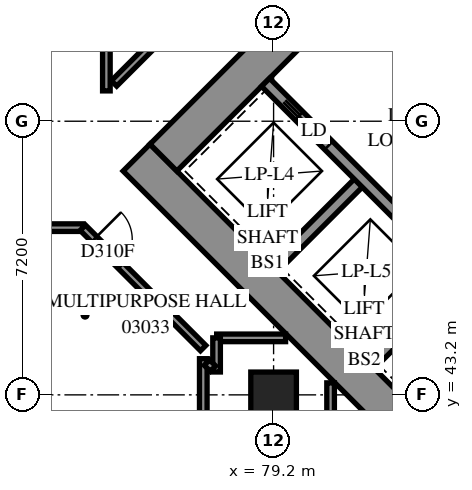
"""IFC4 building model, lengths in metres.
Left out: names, types, materials, properties, quantities, classifications, styles, units other than length and angle.
Written with IfcOpenShell. Run it as: python <this file> out.ifc"""

import sys

from ifc_helpers import new_model, si_unit, direction, frame, frame_2d, origin, origin_2d, place, context, subcontext, project, spatial, polyline, rectangle, outline, extrude, element, fill, save


model = new_model("IFC4")
c1 = context("Model", 3, precision=1e-05, world=origin(), true_north=direction((0.0, 1.0)))
c2 = subcontext(c1, "Body", "Model", "MODEL_VIEW")
j1 = project(units=[si_unit("LENGTHUNIT", "METRE"), si_unit("PLANEANGLEUNIT", "RADIAN")], contexts=[c1])
p1 = place(None, origin())
s1 = spatial("IfcSite", under=j1, at=p1, CompositionType="ELEMENT")
p2 = place(p1, origin())
s2 = spatial("IfcBuilding", under=s1, at=p2, CompositionType="ELEMENT")
p3 = place(p2, frame((0.0, 0.0, 14.4)))
s3 = spatial("IfcBuildingStorey", under=s2, at=p3, CompositionType="ELEMENT", Elevation=14.4)
p4 = place(p3, frame((79.2, 43.2, 0.0), z_axis=(0.0, 0.0, 1.0), x_axis=(1.0, 0.0, 0.0)))
e1 = element("IfcColumn", 1, at=p4, inside=s3, PredefinedType="COLUMN", context=c2, shape_type="SweptSolid", body=[
    extrude(rectangle(XDim=1.2, YDim=1.2, at=origin_2d()), origin(), (0.0, 0.0, 1.0), 3.8),
])
p5 = place(p3, frame((75.594, 49.443, -0.4), z_axis=(0.0, 0.0, 1.0), x_axis=(0.7071037324, -0.70710983, 0.0)))
e2 = element("IfcWall", 2, at=p5, inside=s3, PredefinedType="SHEAR", context=c2, shape_type="SweptSolid", body=[
    extrude(rectangle(XDim=16.4, YDim=1.0, at=frame_2d((8.2, 0.0))), origin(), (0.0, 0.0, 1.0), 3.5),
])
p6 = place(p3, frame((76.301, 49.443, -0.4), z_axis=(0.0, 0.0, 1.0), x_axis=(0.7071067812, 0.7071067812, 0.0)))
e3 = element("IfcWall", 3, at=p6, inside=s3, PredefinedType="SHEAR", context=c2, shape_type="SweptSolid", body=[
    extrude(rectangle(XDim=14.4, YDim=1.0, at=frame_2d((7.2, 0.0))), origin(), (0.0, 0.0, 1.0), 3.5),
])
p7 = place(p6, frame((4.55, 0.0, 0.4)))
e4 = element("IfcOpeningElement", 4, at=p7, cuts=e3, PredefinedType="OPENING", context=c2, shape_type="SweptSolid", body=[
    extrude(rectangle(XDim=1.1, YDim=2.1, at=frame_2d((0.55, 1.05))), frame((0.0, 0.51, 0.0), z_axis=(0.0, -1.0, 0.0), x_axis=(1.0, 0.0, 0.0)), (0.0, 0.0, 1.0), 1.02),
])
p8 = place(p6, frame((11.35, 0.0, 0.4)))
e5 = element("IfcOpeningElement", 5, at=p8, cuts=e3, PredefinedType="OPENING", context=c2, shape_type="SweptSolid", body=[
    extrude(rectangle(XDim=1.1, YDim=2.1, at=frame_2d((0.55, 1.05))), frame((0.0, 0.51, 0.0), z_axis=(0.0, -1.0, 0.0), x_axis=(1.0, 0.0, 0.0)), (0.0, 0.0, 1.0), 1.02),
])
p9 = place(p3, frame((79.2, 46.544, 0.0), z_axis=(0.0, 0.0, 1.0), x_axis=(0.7071219326, 0.7070916295, 0.0)))
e6 = element("IfcWall", 6, at=p9, inside=s3, PredefinedType="SOLIDWALL", context=c2, shape_type="SweptSolid", body=[
    extrude(rectangle(XDim=3.3, YDim=0.3, at=frame_2d((1.65, 0.0))), origin(), (0.0, 0.0, 1.0), 3.8),
])
p10 = place(p3, frame((81.746, 43.999, 0.0), z_axis=(0.0, 0.0, 1.0), x_axis=(0.7071067812, 0.7071067812, 0.0)))
e7 = element("IfcWall", 7, at=p10, inside=s3, PredefinedType="SOLIDWALL", context=c2, shape_type="SweptSolid", body=[
    extrude(rectangle(XDim=3.3, YDim=0.3, at=frame_2d((1.65, 0.0))), origin(), (0.0, 0.0, 1.0), 3.8),
])
p11 = place(p3, frame((78.988, 51.423, 0.0), z_axis=(0.0, 0.0, 1.0), x_axis=(0.7071067812, -0.7071067812, 0.0)))
e8 = element("IfcWall", 8, at=p11, inside=s3, PredefinedType="SOLIDWALL", context=c2, shape_type="SweptSolid", body=[
    extrude(rectangle(XDim=14.4, YDim=0.3, at=frame_2d((7.2, 0.0))), origin(), (0.0, 0.0, 1.0), 3.8),
])
p12 = place(p11, frame((1.25, 0.0, 0.0)))
e9 = element("IfcOpeningElement", 9, at=p12, cuts=e8, PredefinedType="OPENING", context=c2, shape_type="SweptSolid", body=[
    extrude(rectangle(XDim=1.1, YDim=2.1, at=frame_2d((0.55, 1.05))), frame((0.0, 0.16, 0.0), z_axis=(0.0, -1.0, 0.0), x_axis=(1.0, 0.0, 0.0)), (0.0, 0.0, 1.0), 0.32),
])
p13 = place(p11, frame((4.85, 0.0, 0.0)))
e10 = element("IfcOpeningElement", 10, at=p13, cuts=e8, PredefinedType="OPENING", context=c2, shape_type="SweptSolid", body=[
    extrude(rectangle(XDim=1.1, YDim=2.1, at=frame_2d((0.55, 1.05))), frame((0.0, 0.16, 0.0), z_axis=(0.0, -1.0, 0.0), x_axis=(1.0, 0.0, 0.0)), (0.0, 0.0, 1.0), 0.32),
])
p14 = place(p11, frame((8.45, 0.0, 0.0)))
e11 = element("IfcOpeningElement", 11, at=p14, cuts=e8, PredefinedType="OPENING", context=c2, shape_type="SweptSolid", body=[
    extrude(rectangle(XDim=1.1, YDim=2.1, at=frame_2d((0.55, 1.05))), frame((0.0, 0.16, 0.0), z_axis=(0.0, -1.0, 0.0), x_axis=(1.0, 0.0, 0.0)), (0.0, 0.0, 1.0), 0.32),
])
p15 = place(p11, frame((12.05, 0.0, 0.0)))
e12 = element("IfcOpeningElement", 12, at=p15, cuts=e8, PredefinedType="OPENING", context=c2, shape_type="SweptSolid", body=[
    extrude(rectangle(XDim=1.1, YDim=2.1, at=frame_2d((0.55, 1.05))), frame((0.0, 0.16, 0.0), z_axis=(0.0, -1.0, 0.0), x_axis=(1.0, 0.0, 0.0)), (0.0, 0.0, 1.0), 0.32),
])
p16 = place(p3, frame((81.534, 53.969, 0.0), z_axis=(0.0, 0.0, 1.0), x_axis=(0.707103309, -0.7071102534, 0.0)))
e13 = element("IfcWall", 13, at=p16, inside=s3, PredefinedType="SOLIDWALL", context=c2, shape_type="SweptSolid", body=[
    extrude(rectangle(XDim=14.4, YDim=0.3, at=frame_2d((7.2, 0.0))), origin(), (0.0, 0.0, 1.0), 3.8),
])
p17 = place(p16, frame((12.05, 0.0, 0.0)))
e14 = element("IfcOpeningElement", 14, at=p17, cuts=e13, PredefinedType="OPENING", context=c2, shape_type="SweptSolid", body=[
    extrude(rectangle(XDim=1.1, YDim=2.1, at=frame_2d((0.55, 1.05))), frame((0.0, 0.16, 0.0), z_axis=(0.0, -1.0, 0.0), x_axis=(1.0, 0.0, 0.0)), (0.0, 0.0, 1.0), 0.32),
])
p18 = place(p3, frame((117.843, 34.665, 0.0), z_axis=(0.0, 0.0, 1.0), x_axis=(-0.7071067812, 0.7071067812, 0.0)))
e15 = element("IfcWall", 15, at=p18, inside=s3, PredefinedType="SOLIDWALL", context=c2, shape_type="SweptSolid", body=[
    extrude(outline(polyline([(-0.275, -0.275), (54.222, -0.275), (53.994, 0.275), (0.275, 0.275), (-0.275, -0.275)])), origin(), (0.0, 0.0, 1.0), 3.8),
])
p19 = place(p18, frame((0.8, 0.0, 0.7)))
e16 = element("IfcOpeningElement", 16, at=p19, cuts=e15, PredefinedType="OPENING", context=c2, shape_type="SweptSolid", body=[
    extrude(rectangle(XDim=1.8, YDim=2.6, at=frame_2d((0.9, 1.3))), frame((0.0, 0.285, 0.0), z_axis=(0.0, -1.0, 0.0), x_axis=(1.0, 0.0, 0.0)), (0.0, 0.0, 1.0), 0.57),
])
p20 = place(p18, frame((4.225, 0.0, 0.7)))
e17 = element("IfcOpeningElement", 17, at=p20, cuts=e15, PredefinedType="OPENING", context=c2, shape_type="SweptSolid", body=[
    extrude(rectangle(XDim=1.8, YDim=2.6, at=frame_2d((0.9, 1.3))), frame((0.0, 0.285, 0.0), z_axis=(0.0, -1.0, 0.0), x_axis=(1.0, 0.0, 0.0)), (0.0, 0.0, 1.0), 0.57),
])
p21 = place(p18, frame((7.825, 0.0, 0.7)))
e18 = element("IfcOpeningElement", 18, at=p21, cuts=e15, PredefinedType="OPENING", context=c2, shape_type="SweptSolid", body=[
    extrude(rectangle(XDim=1.8, YDim=2.6, at=frame_2d((0.9, 1.3))), frame((0.0, 0.285, 0.0), z_axis=(0.0, -1.0, 0.0), x_axis=(1.0, 0.0, 0.0)), (0.0, 0.0, 1.0), 0.57),
])
p22 = place(p18, frame((11.425, 0.0, 0.7)))
e19 = element("IfcOpeningElement", 19, at=p22, cuts=e15, PredefinedType="OPENING", context=c2, shape_type="SweptSolid", body=[
    extrude(rectangle(XDim=1.8, YDim=2.6, at=frame_2d((0.9, 1.3))), frame((0.0, 0.285, 0.0), z_axis=(0.0, -1.0, 0.0), x_axis=(1.0, 0.0, 0.0)), (0.0, 0.0, 1.0), 0.57),
])
p23 = place(p18, frame((15.025, 0.0, 0.7)))
e20 = element("IfcOpeningElement", 20, at=p23, cuts=e15, PredefinedType="OPENING", context=c2, shape_type="SweptSolid", body=[
    extrude(rectangle(XDim=1.8, YDim=2.6, at=frame_2d((0.9, 1.3))), frame((0.0, 0.285, 0.0), z_axis=(0.0, -1.0, 0.0), x_axis=(1.0, 0.0, 0.0)), (0.0, 0.0, 1.0), 0.57),
])
p24 = place(p18, frame((18.625, 0.0, 0.7)))
e21 = element("IfcOpeningElement", 21, at=p24, cuts=e15, PredefinedType="OPENING", context=c2, shape_type="SweptSolid", body=[
    extrude(rectangle(XDim=1.8, YDim=2.6, at=frame_2d((0.9, 1.3))), frame((0.0, 0.285, 0.0), z_axis=(0.0, -1.0, 0.0), x_axis=(1.0, 0.0, 0.0)), (0.0, 0.0, 1.0), 0.57),
])
p25 = place(p18, frame((22.225, 0.0, 0.7)))
e22 = element("IfcOpeningElement", 22, at=p25, cuts=e15, PredefinedType="OPENING", context=c2, shape_type="SweptSolid", body=[
    extrude(rectangle(XDim=1.8, YDim=2.6, at=frame_2d((0.9, 1.3))), frame((0.0, 0.285, 0.0), z_axis=(0.0, -1.0, 0.0), x_axis=(1.0, 0.0, 0.0)), (0.0, 0.0, 1.0), 0.57),
])
p26 = place(p18, frame((25.825, 0.0, 0.7)))
e23 = element("IfcOpeningElement", 23, at=p26, cuts=e15, PredefinedType="OPENING", context=c2, shape_type="SweptSolid", body=[
    extrude(rectangle(XDim=1.8, YDim=2.6, at=frame_2d((0.9, 1.3))), frame((0.0, 0.285, 0.0), z_axis=(0.0, -1.0, 0.0), x_axis=(1.0, 0.0, 0.0)), (0.0, 0.0, 1.0), 0.57),
])
p27 = place(p18, frame((29.425, 0.0, 0.7)))
e24 = element("IfcOpeningElement", 24, at=p27, cuts=e15, PredefinedType="OPENING", context=c2, shape_type="SweptSolid", body=[
    extrude(rectangle(XDim=1.8, YDim=2.6, at=frame_2d((0.9, 1.3))), frame((0.0, 0.285, 0.0), z_axis=(0.0, -1.0, 0.0), x_axis=(1.0, 0.0, 0.0)), (0.0, 0.0, 1.0), 0.57),
])
p28 = place(p18, frame((33.025, 0.0, 0.7)))
e25 = element("IfcOpeningElement", 25, at=p28, cuts=e15, PredefinedType="OPENING", context=c2, shape_type="SweptSolid", body=[
    extrude(rectangle(XDim=1.8, YDim=2.6, at=frame_2d((0.9, 1.3))), frame((0.0, 0.285, 0.0), z_axis=(0.0, -1.0, 0.0), x_axis=(1.0, 0.0, 0.0)), (0.0, 0.0, 1.0), 0.57),
])
p29 = place(p18, frame((36.625, 0.0, 0.7)))
e26 = element("IfcOpeningElement", 26, at=p29, cuts=e15, PredefinedType="OPENING", context=c2, shape_type="SweptSolid", body=[
    extrude(rectangle(XDim=1.8, YDim=2.6, at=frame_2d((0.9, 1.3))), frame((0.0, 0.285, 0.0), z_axis=(0.0, -1.0, 0.0), x_axis=(1.0, 0.0, 0.0)), (0.0, 0.0, 1.0), 0.57),
])
p30 = place(p18, frame((40.225, 0.0, 0.7)))
e27 = element("IfcOpeningElement", 27, at=p30, cuts=e15, PredefinedType="OPENING", context=c2, shape_type="SweptSolid", body=[
    extrude(rectangle(XDim=1.8, YDim=2.6, at=frame_2d((0.9, 1.3))), frame((0.0, 0.285, 0.0), z_axis=(0.0, -1.0, 0.0), x_axis=(1.0, 0.0, 0.0)), (0.0, 0.0, 1.0), 0.57),
])
p31 = place(p18, frame((43.825, 0.0, 0.7)))
e28 = element("IfcOpeningElement", 28, at=p31, cuts=e15, PredefinedType="OPENING", context=c2, shape_type="SweptSolid", body=[
    extrude(rectangle(XDim=1.8, YDim=2.6, at=frame_2d((0.9, 1.3))), frame((0.0, 0.285, 0.0), z_axis=(0.0, -1.0, 0.0), x_axis=(1.0, 0.0, 0.0)), (0.0, 0.0, 1.0), 0.57),
])
p32 = place(p18, frame((47.425, 0.0, 0.7)))
e29 = element("IfcOpeningElement", 29, at=p32, cuts=e15, PredefinedType="OPENING", context=c2, shape_type="SweptSolid", body=[
    extrude(rectangle(XDim=1.8, YDim=2.6, at=frame_2d((0.9, 1.3))), frame((0.0, 0.285, 0.0), z_axis=(0.0, -1.0, 0.0), x_axis=(1.0, 0.0, 0.0)), (0.0, 0.0, 1.0), 0.57),
])
p33 = place(p18, frame((51.06, 0.0, 0.7)))
e30 = element("IfcOpeningElement", 30, at=p33, cuts=e15, PredefinedType="OPENING", context=c2, shape_type="SweptSolid", body=[
    extrude(rectangle(XDim=1.8, YDim=2.6, at=frame_2d((0.9, 1.3))), frame((0.0, 0.285, 0.0), z_axis=(0.0, -1.0, 0.0), x_axis=(1.0, 0.0, 0.0)), (0.0, 0.0, 1.0), 0.57),
])
p34 = place(p3, frame((54.8, 47.6, 0.0), z_axis=(0.0, 0.0, 1.0), x_axis=(1.0, 0.0, 0.0)))
e31 = element("IfcWall", 31, at=p34, inside=s3, PredefinedType="PARTITIONING", context=c2, shape_type="SweptSolid", body=[
    extrude(rectangle(XDim=19.384, YDim=0.2, at=frame_2d((9.692, 0.0))), origin(), (0.0, 0.0, 1.0), 3.8),
])
p35 = place(p34, frame((8.458, 0.0, 0.0)))
e32 = element("IfcOpeningElement", 32, at=p35, cuts=e31, PredefinedType="OPENING", context=c2, shape_type="SweptSolid", body=[
    extrude(rectangle(XDim=1.0, YDim=2.1, at=frame_2d((0.5, 1.05))), frame((0.0, 0.11, 0.0), z_axis=(0.0, -1.0, 0.0), x_axis=(1.0, 0.0, 0.0)), (0.0, 0.0, 1.0), 0.22),
])
p36 = place(p34, frame((14.107, 0.0, 0.0)))
e33 = element("IfcOpeningElement", 33, at=p36, cuts=e31, PredefinedType="OPENING", context=c2, shape_type="SweptSolid", body=[
    extrude(rectangle(XDim=1.0, YDim=2.1, at=frame_2d((0.5, 1.05))), frame((0.0, 0.11, 0.0), z_axis=(0.0, -1.0, 0.0), x_axis=(1.0, 0.0, 0.0)), (0.0, 0.0, 1.0), 0.22),
])
p37 = place(p3, frame((74.181, 47.597, 0.0), z_axis=(0.0, 0.0, 1.0), x_axis=(0.7071067812, -0.7071067812, 0.0)))
e34 = element("IfcWall", 34, at=p37, inside=s3, PredefinedType="PARTITIONING", context=c2, shape_type="SweptSolid", body=[
    extrude(rectangle(XDim=4.477, YDim=0.2, at=frame_2d((2.239, 0.0))), origin(), (0.0, 0.0, 1.0), 3.8),
])
p38 = place(p37, frame((0.423, 0.0, 0.0)))
e35 = element("IfcOpeningElement", 35, at=p38, cuts=e34, PredefinedType="OPENING", context=c2, shape_type="SweptSolid", body=[
    extrude(rectangle(XDim=1.0, YDim=2.1, at=frame_2d((0.5, 1.05))), frame((0.0, 0.11, 0.0), z_axis=(0.0, -1.0, 0.0), x_axis=(1.0, 0.0, 0.0)), (0.0, 0.0, 1.0), 0.22),
])
p39 = place(p3, frame((75.001, 51.395, 0.0), z_axis=(0.0, 0.0, 1.0), x_axis=(0.7075218716, 0.7066914469, 0.0)))
e36 = element("IfcWall", 36, at=p39, inside=s3, PredefinedType="PARTITIONING", context=c2, shape_type="SweptSolid", body=[
    extrude(rectangle(XDim=2.408, YDim=0.2, at=frame_2d((1.204, 0.0))), origin(), (0.0, 0.0, 1.0), 3.8),
])
p40 = place(p3, frame((74.8, 51.198, 0.0), z_axis=(0.0, 0.0, 1.0), x_axis=(0.0, 1.0, 0.0)))
e37 = element("IfcWall", 37, at=p40, inside=s3, PredefinedType="PARTITIONING", context=c2, shape_type="SweptSolid", body=[
    extrude(rectangle(XDim=1.902, YDim=0.2, at=frame_2d((0.951, 0.0))), origin(), (0.0, 0.0, 1.0), 3.8),
])
for number, where, z_axis, x_axis in (
    (38, (77.702, 44.7, 0.0), (0.0, 0.0, 1.0), (1.0, 0.0, 0.0)),
    (39, (80.7, 41.702, 0.0), (0.0, 0.0, 1.0), (0.0, 1.0, 0.0)),
):
    element("IfcWall", number, at=place(p3, frame(where, z_axis=z_axis, x_axis=x_axis)), inside=s3, PredefinedType="PARTITIONING", context=c2, shape_type="SweptSolid", body=[
        extrude(rectangle(XDim=1.814, YDim=0.2, at=frame_2d((0.907, 0.0))), origin(), (0.0, 0.0, 1.0), 3.8),
    ])
p41 = place(p3, frame((77.35, 42.384, 0.0), z_axis=(0.0, 0.0, 1.0), x_axis=(0.0, 1.0, 0.0)))
e40 = element("IfcWall", 40, at=p41, inside=s3, PredefinedType="PARTITIONING", context=c2, shape_type="SweptSolid", body=[
    extrude(rectangle(XDim=1.768, YDim=0.2, at=frame_2d((0.884, 0.0))), origin(), (0.0, 0.0, 1.0), 3.8),
])
p42 = place(p3, frame((77.7, 43.802, 0.0), z_axis=(0.0, 0.0, 1.0), x_axis=(0.0, 1.0, 0.0)))
e41 = element("IfcWall", 41, at=p42, inside=s3, PredefinedType="PARTITIONING", context=c2, shape_type="SweptSolid", body=[
    extrude(rectangle(XDim=0.898, YDim=0.2, at=frame_2d((0.449, 0.0))), origin(), (0.0, 0.0, 1.0), 3.8),
])
p43 = place(p3, frame((77.445, 44.05, 0.0), z_axis=(0.0, 0.0, 1.0), x_axis=(0.707329037, -0.7068844555, 0.0)))
e42 = element("IfcWall", 42, at=p43, inside=s3, PredefinedType="PARTITIONING", context=c2, shape_type="SweptSolid", body=[
    extrude(rectangle(XDim=0.225, YDim=0.2, at=frame_2d((0.112, 0.0))), origin(), (0.0, 0.0, 1.0), 3.8),
])
p44 = place(p12, origin())
e43 = element("IfcDoor", 43, at=p44, inside=s3, OperationType="SLIDING_TO_LEFT", PredefinedType="DOOR", context=c2, shape_type="SweptSolid", body=[
    extrude(rectangle(XDim=1.1, YDim=2.1, at=frame_2d((0.55, 1.05))), frame((0.0, 0.025, 0.0), z_axis=(0.0, -1.0, 0.0), x_axis=(1.0, 0.0, 0.0)), (0.0, 0.0, 1.0), 0.05),
])
fill(e9, e43)
p45 = place(p38, origin())
e44 = element("IfcDoor", 44, at=p45, inside=s3, OperationType="SINGLE_SWING_LEFT", PredefinedType="DOOR", context=c2, shape_type="SweptSolid", body=[
    extrude(rectangle(XDim=1.0, YDim=2.1, at=frame_2d((0.5, 1.05))), frame((0.0, 0.025, 0.0), z_axis=(0.0, -1.0, 0.0), x_axis=(1.0, 0.0, 0.0)), (0.0, 0.0, 1.0), 0.05),
])
fill(e35, e44)
save(model, sys.argv[1])
